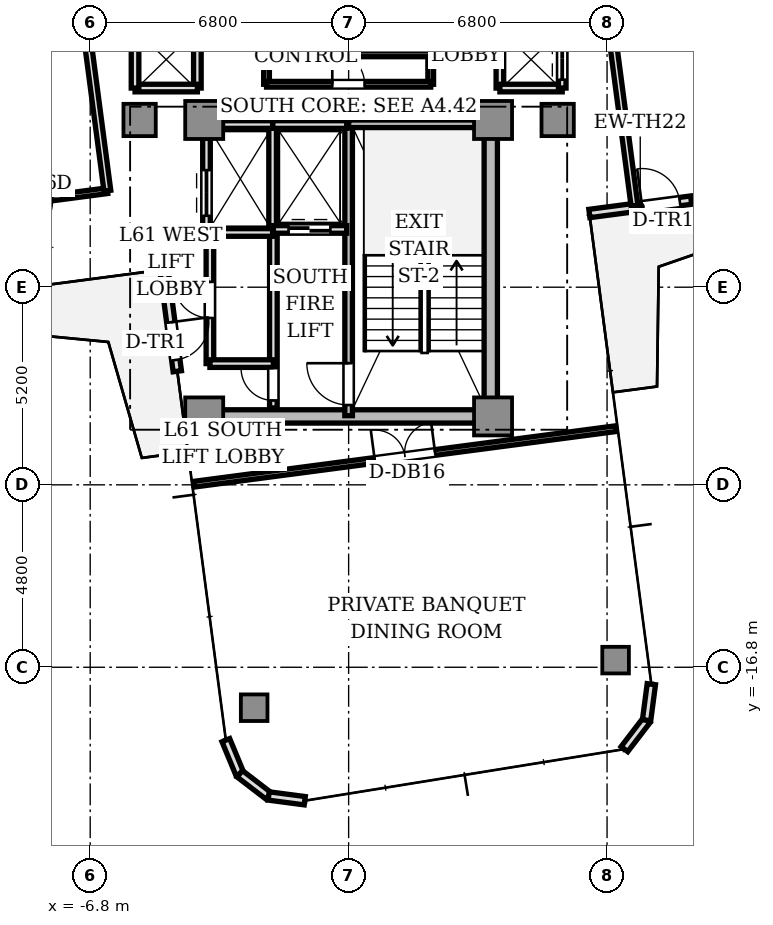
"""IFC4 building model, lengths in metres.
Left out: names, types, materials, properties, quantities, classifications, styles, units other than length and angle.
Written with IfcOpenShell. Run it as: python <this file> out.ifc"""

import sys

from ifc_helpers import new_model, si_unit, direction, frame, frame_2d, origin, origin_2d, place, context, subcontext, project, spatial, rectangle, extrude, source, transform, mapped, element, fill, save


model = new_model("IFC4")
c1 = context("Model", 3, precision=1e-05, world=origin(), true_north=direction((0.0, 1.0)))
c2 = subcontext(c1, "Body", "Model", "MODEL_VIEW")
j1 = project(units=[si_unit("LENGTHUNIT", "METRE"), si_unit("PLANEANGLEUNIT", "RADIAN")], contexts=[c1])
p1 = place(None, origin())
s1 = spatial("IfcSite", under=j1, at=p1, CompositionType="ELEMENT")
p2 = place(p1, origin())
s2 = spatial("IfcBuilding", under=s1, at=p2, CompositionType="ELEMENT")
p3 = place(p2, frame((0.0, 0.0, 219.9)))
s3 = spatial("IfcBuildingStorey", under=s2, at=p3, CompositionType="ELEMENT", Elevation=219.9)
p4 = place(p3, frame((-3.55, -10.2, 0.0), z_axis=(0.0, 0.0, 1.0), x_axis=(1.0, 0.0, 0.0)))
e1 = element("IfcWall", 1, at=p4, inside=s3, PredefinedType="SHEAR", context=c2, shape_type="SweptSolid", body=[
    extrude(rectangle(XDim=7.1, YDim=0.35, at=frame_2d((3.55, 0.0))), origin(), (0.0, 0.0, 1.0), 3.11),
])
p5 = place(p3, frame((3.74, -9.75, 0.0), z_axis=(0.0, 0.0, 1.0), x_axis=(0.0, 1.0, 0.0)))
e2 = element("IfcWall", 2, at=p5, inside=s3, PredefinedType="SHEAR", context=c2, shape_type="SweptSolid", body=[
    extrude(rectangle(XDim=6.9, YDim=0.35, at=frame_2d((3.45, 0.0))), origin(), (0.0, 0.0, 1.0), 3.11),
])
m1 = source(origin(), c2, "Body", "SweptSolid", [
    extrude(rectangle(XDim=1.0, YDim=1.0, at=origin_2d()), origin(), (0.0, 0.0, 1.0), 3.11),
])
for number, where, z_axis, x_axis in (
    (3, (-3.8, -2.4, 0.0), (0.0, 0.0, 1.0), (1.0, 0.0, 0.0)),
    (4, (3.8, -2.4, 0.0), (0.0, 0.0, 1.0), (1.0, 0.0, 0.0)),
    (5, (-3.8, -10.2, 0.0), (0.0, 0.0, 1.0), (1.0, 0.0, 0.0)),
    (6, (3.8, -10.2, 0.0), (0.0, 0.0, 1.0), (1.0, 0.0, 0.0)),
):
    element("IfcColumn", number, at=place(p3, frame(where, z_axis=z_axis, x_axis=x_axis)), inside=s3, PredefinedType="COLUMN", context=c2, shape_type="MappedRepresentation", body=[
        mapped(m1, transform((0.0, 0.0, 0.0), scale=1.0)),
    ])
m2 = source(origin(), c2, "Body", "SweptSolid", [
    extrude(rectangle(XDim=0.85, YDim=0.85, at=origin_2d()), origin(), (0.0, 0.0, 1.0), 3.11),
])
for number, where, z_axis, x_axis in (
    (7, (5.5, -2.4, 0.0), (0.0, 0.0, 1.0), (1.0, 0.0, 0.0)),
    (8, (-5.5, -2.4, 0.0), (0.0, 0.0, 1.0), (1.0, 0.0, 0.0)),
):
    element("IfcColumn", number, at=place(p3, frame(where, z_axis=z_axis, x_axis=x_axis)), inside=s3, PredefinedType="COLUMN", context=c2, shape_type="MappedRepresentation", body=[
        mapped(m2, transform((0.0, 0.0, 0.0), scale=1.0)),
    ])
m3 = source(origin(), c2, "Body", "SweptSolid", [
    extrude(rectangle(XDim=0.7, YDim=0.7, at=origin_2d()), origin(), (0.0, 0.0, 1.0), 3.11),
])
for number, where, z_axis, x_axis in (
    (9, (-2.486, -17.864, 0.0), (0.0, 0.0, 1.0), (1.0, 0.0, 0.0)),
    (10, (7.024, -16.612, 0.0), (0.0, 0.0, 1.0), (1.0, 0.0, 0.0)),
):
    element("IfcColumn", number, at=place(p3, frame(where, z_axis=z_axis, x_axis=x_axis)), inside=s3, PredefinedType="COLUMN", context=c2, shape_type="MappedRepresentation", body=[
        mapped(m3, transform((0.0, 0.0, 0.0), scale=1.0)),
    ])
p6 = place(p3, frame((6.335, -4.861, 0.0), z_axis=(0.0, 0.0, 1.0), x_axis=(0.991449985986, 0.130487261016, 0.0)))
e11 = element("IfcWall", 11, at=p6, inside=s3, PredefinedType="STANDARD", context=c2, shape_type="SweptSolid", body=[
    extrude(rectangle(XDim=2.7, YDim=0.22, at=frame_2d((1.35, 0.0))), origin(), (0.0, 0.0, 1.0), 3.11),
])
p7 = place(p6, frame((1.4, 0.0, 0.0)))
e12 = element("IfcOpeningElement", 12, at=p7, cuts=e11, PredefinedType="OPENING", context=c2, shape_type="SweptSolid", body=[
    extrude(rectangle(XDim=1.0, YDim=2.2, at=frame_2d((0.5, 1.1))), frame((0.0, 0.12, 0.0), z_axis=(0.0, -1.0, 0.0), x_axis=(1.0, 0.0, 0.0)), (0.0, 0.0, 1.0), 0.24),
])
p8 = place(p3, frame((-4.861, -6.335, 0.0), z_axis=(0.0, 0.0, 1.0), x_axis=(0.130487261016, -0.991449985986, 0.0)))
e13 = element("IfcWall", 13, at=p8, inside=s3, PredefinedType="STANDARD", context=c2, shape_type="SweptSolid", body=[
    extrude(rectangle(XDim=2.7, YDim=0.22, at=frame_2d((1.35, 0.0))), origin(), (0.0, 0.0, 1.0), 3.11),
])
p9 = place(p8, frame((1.4, 0.0, 0.0)))
e14 = element("IfcOpeningElement", 14, at=p9, cuts=e13, PredefinedType="OPENING", context=c2, shape_type="SweptSolid", body=[
    extrude(rectangle(XDim=1.0, YDim=2.2, at=frame_2d((0.5, 1.1))), frame((0.0, 0.12, 0.0), z_axis=(0.0, -1.0, 0.0), x_axis=(1.0, 0.0, 0.0)), (0.0, 0.0, 1.0), 0.24),
])
p10 = place(p3, frame((-3.23, -18.719, 0.0), z_axis=(0.0, 0.0, 1.0), x_axis=(0.382441868588, -0.923979554509, 0.0)))
e15 = element("IfcWall", 15, at=p10, inside=s3, PredefinedType="STANDARD", context=c2, shape_type="SweptSolid", body=[
    extrude(rectangle(XDim=0.958, YDim=0.22, at=frame_2d((0.479, 0.0))), origin(), (0.0, 0.0, 1.0), 3.11),
])
p11 = place(p3, frame((-2.864, -19.604, 0.0), z_axis=(0.0, 0.0, 1.0), x_axis=(0.79343813584, -0.60865090536, 0.0)))
e16 = element("IfcWall", 16, at=p11, inside=s3, PredefinedType="STANDARD", context=c2, shape_type="SweptSolid", body=[
    extrude(rectangle(XDim=0.958, YDim=0.22, at=frame_2d((0.479, 0.0))), origin(), (0.0, 0.0, 1.0), 3.11),
])
p12 = place(p3, frame((-2.104, -20.187, 0.0), z_axis=(0.0, 0.0, 1.0), x_axis=(0.991440402921, -0.13056005306, 0.0)))
e17 = element("IfcWall", 17, at=p12, inside=s3, PredefinedType="STANDARD", context=c2, shape_type="SweptSolid", body=[
    extrude(rectangle(XDim=0.958, YDim=0.22, at=frame_2d((0.479, 0.0))), origin(), (0.0, 0.0, 1.0), 3.11),
])
for number, where, z_axis, x_axis in (
    (18, (7.257, -18.954, 0.0), (0.0, 0.0, 1.0), (0.609, 0.793, 0.0)),
    (19, (7.84, -18.194, 0.0), (0.0, 0.0, 1.0), (0.131, 0.991, 0.0)),
):
    element("IfcWall", number, at=place(p3, frame(where, z_axis=z_axis, x_axis=x_axis)), inside=s3, PredefinedType="STANDARD", context=c2, shape_type="SweptSolid", body=[
        extrude(rectangle(XDim=0.958, YDim=0.22, at=frame_2d((0.479, 0.0))), origin(), (0.0, 0.0, 1.0), 3.11),
    ])
p13 = place(p3, frame((0.0, -10.18, 0.0), z_axis=(0.0, 0.0, 1.0), x_axis=(0.0, 1.0, 0.0)))
e20 = element("IfcWall", 20, at=p13, inside=s3, PredefinedType="SOLIDWALL", context=c2, shape_type="SweptSolid", body=[
    extrude(rectangle(XDim=7.68, YDim=0.2, at=frame_2d((3.84, 0.0))), origin(), (0.0, 0.0, 1.0), 3.11),
])
p14 = place(p13, frame((0.28, 0.0, 0.0)))
e21 = element("IfcOpeningElement", 21, at=p14, cuts=e20, PredefinedType="OPENING", context=c2, shape_type="SweptSolid", body=[
    extrude(rectangle(XDim=1.1, YDim=2.15, at=frame_2d((0.55, 1.075))), frame((0.0, 0.11, 0.0), z_axis=(0.0, -1.0, 0.0), x_axis=(1.0, 0.0, 0.0)), (0.0, 0.0, 1.0), 0.22),
])
p15 = place(p3, frame((0.0, -2.5, 0.0), z_axis=(0.0, 0.0, 1.0), x_axis=(1.0, 0.0, 0.0)))
e22 = element("IfcWall", 22, at=p15, inside=s3, PredefinedType="SOLIDWALL", context=c2, shape_type="SweptSolid", body=[
    extrude(rectangle(XDim=3.72, YDim=0.2, at=frame_2d((1.86, 0.0))), origin(), (0.0, 0.0, 1.0), 3.11),
])
p16 = place(p3, frame((-1.98, -9.98, 0.0), z_axis=(0.0, 0.0, 1.0), x_axis=(0.0, 1.0, 0.0)))
e23 = element("IfcWall", 23, at=p16, inside=s3, PredefinedType="SOLIDWALL", context=c2, shape_type="SweptSolid", body=[
    extrude(rectangle(XDim=4.66, YDim=0.2, at=frame_2d((2.33, 0.0))), origin(), (0.0, 0.0, 1.0), 2.66),
])
p17 = place(p16, frame((0.2, 0.0, 0.0)))
e24 = element("IfcOpeningElement", 24, at=p17, cuts=e23, PredefinedType="OPENING", context=c2, shape_type="SweptSolid", body=[
    extrude(rectangle(XDim=0.85, YDim=2.1, at=frame_2d((0.425, 1.05))), frame((0.0, 0.11, 0.0), z_axis=(0.0, -1.0, 0.0), x_axis=(1.0, 0.0, 0.0)), (0.0, 0.0, 1.0), 0.22),
])
p18 = place(p3, frame((-2.0, -5.28, 0.0), z_axis=(0.0, 0.0, 1.0), x_axis=(0.0, 1.0, 0.0)))
e25 = element("IfcWall", 25, at=p18, inside=s3, PredefinedType="SOLIDWALL", context=c2, shape_type="SweptSolid", body=[
    extrude(rectangle(XDim=2.78, YDim=0.2, at=frame_2d((1.39, 0.0))), origin(), (0.0, 0.0, 1.0), 2.66),
])
p19 = place(p3, frame((-2.0, -2.52, 0.0), z_axis=(0.0, 0.0, 1.0), x_axis=(1.0, 0.0, 0.0)))
e26 = element("IfcWall", 26, at=p19, inside=s3, PredefinedType="SOLIDWALL", context=c2, shape_type="SweptSolid", body=[
    extrude(rectangle(XDim=1.95, YDim=0.2, at=frame_2d((0.975, 0.0))), origin(), (0.0, 0.0, 1.0), 2.66),
])
p20 = place(p3, frame((-1.98, -5.28, 0.0), z_axis=(0.0, 0.0, 1.0), x_axis=(1.0, 0.0, 0.0)))
e27 = element("IfcWall", 27, at=p20, inside=s3, PredefinedType="SOLIDWALL", context=c2, shape_type="SweptSolid", body=[
    extrude(rectangle(XDim=1.93, YDim=0.2, at=frame_2d((0.965, 0.0))), origin(), (0.0, 0.0, 1.0), 2.66),
])
p21 = place(p20, frame((0.4, 0.0, 0.0)))
e28 = element("IfcOpeningElement", 28, at=p21, cuts=e27, PredefinedType="OPENING", context=c2, shape_type="SweptSolid", body=[
    extrude(rectangle(XDim=1.1, YDim=2.2, at=frame_2d((0.55, 1.1))), frame((0.0, 0.11, 0.0), z_axis=(0.0, -1.0, 0.0), x_axis=(1.0, 0.0, 0.0)), (0.0, 0.0, 1.0), 0.22),
])
p22 = place(p3, frame((-3.32, -2.52, 0.0), z_axis=(0.0, 0.0, 1.0), x_axis=(1.0, 0.0, 0.0)))
e29 = element("IfcWall", 29, at=p22, inside=s3, PredefinedType="SOLIDWALL", context=c2, shape_type="SweptSolid", body=[
    extrude(rectangle(XDim=1.32, YDim=0.2, at=frame_2d((0.66, 0.0))), origin(), (0.0, 0.0, 1.0), 2.66),
])
p23 = place(p3, frame((-3.74, -5.36, 0.0), z_axis=(0.0, 0.0, 1.0), x_axis=(1.0, 0.0, 0.0)))
e30 = element("IfcWall", 30, at=p23, inside=s3, PredefinedType="SOLIDWALL", context=c2, shape_type="SweptSolid", body=[
    extrude(rectangle(XDim=1.74, YDim=0.2, at=frame_2d((0.87, 0.0))), origin(), (0.0, 0.0, 1.0), 2.66),
])
p24 = place(p3, frame((-3.74, -5.36, 0.0), z_axis=(0.0, 0.0, 1.0), x_axis=(0.0, 1.0, 0.0)))
e31 = element("IfcWall", 31, at=p24, inside=s3, PredefinedType="SOLIDWALL", context=c2, shape_type="SweptSolid", body=[
    extrude(rectangle(XDim=2.48, YDim=0.2, at=frame_2d((1.24, 0.0))), origin(), (0.0, 0.0, 1.0), 2.66),
])
p25 = place(p24, frame((0.44, 0.0, 0.0)))
e32 = element("IfcOpeningElement", 32, at=p25, cuts=e31, PredefinedType="OPENING", context=c2, shape_type="SweptSolid", body=[
    extrude(rectangle(XDim=1.2, YDim=2.2, at=frame_2d((0.6, 1.1))), frame((0.0, 0.11, 0.0), z_axis=(0.0, -1.0, 0.0), x_axis=(1.0, 0.0, 0.0)), (0.0, 0.0, 1.0), 0.22),
])
p26 = place(p3, frame((3.98, -1.56, 0.0), z_axis=(0.0, 0.0, 1.0), x_axis=(0.0, 1.0, 0.0)))
e33 = element("IfcWall", 33, at=p26, inside=s3, PredefinedType="SOLIDWALL", context=c2, shape_type="SweptSolid", body=[
    extrude(rectangle(XDim=3.12, YDim=0.2, at=frame_2d((1.56, 0.0))), origin(), (0.0, 0.0, 1.0), 2.33),
])
p27 = place(p3, frame((3.98, -1.56, 0.0), z_axis=(0.0, 0.0, 1.0), x_axis=(1.0, 0.0, 0.0)))
e34 = element("IfcWall", 34, at=p27, inside=s3, PredefinedType="SOLIDWALL", context=c2, shape_type="SweptSolid", body=[
    extrude(rectangle(XDim=1.64, YDim=0.2, at=frame_2d((0.82, 0.0))), origin(), (0.0, 0.0, 1.0), 2.66),
])
p28 = place(p3, frame((5.62, -1.56, 0.0), z_axis=(0.0, 0.0, 1.0), x_axis=(0.0, 1.0, 0.0)))
e35 = element("IfcWall", 35, at=p28, inside=s3, PredefinedType="SOLIDWALL", context=c2, shape_type="SweptSolid", body=[
    extrude(rectangle(XDim=1.56, YDim=0.2, at=frame_2d((0.78, 0.0))), origin(), (0.0, 0.0, 1.0), 2.66),
])
p29 = place(p28, frame((0.22, 0.0, 0.0)))
e36 = element("IfcOpeningElement", 36, at=p29, cuts=e35, PredefinedType="OPENING", context=c2, shape_type="SweptSolid", body=[
    extrude(rectangle(XDim=1.1, YDim=2.2, at=frame_2d((0.55, 1.1))), frame((0.0, 0.11, 0.0), z_axis=(0.0, -1.0, 0.0), x_axis=(1.0, 0.0, 0.0)), (0.0, 0.0, 1.0), 0.22),
])
p30 = place(p3, frame((-3.98, -1.56, 0.0), z_axis=(0.0, 0.0, 1.0), x_axis=(0.0, 1.0, 0.0)))
e37 = element("IfcWall", 37, at=p30, inside=s3, PredefinedType="SOLIDWALL", context=c2, shape_type="SweptSolid", body=[
    extrude(rectangle(XDim=3.12, YDim=0.2, at=frame_2d((1.56, 0.0))), origin(), (0.0, 0.0, 1.0), 2.33),
])
p31 = place(p3, frame((-5.62, -1.56, 0.0), z_axis=(0.0, 0.0, 1.0), x_axis=(1.0, 0.0, 0.0)))
e38 = element("IfcWall", 38, at=p31, inside=s3, PredefinedType="SOLIDWALL", context=c2, shape_type="SweptSolid", body=[
    extrude(rectangle(XDim=1.64, YDim=0.2, at=frame_2d((0.82, 0.0))), origin(), (0.0, 0.0, 1.0), 2.66),
])
p32 = place(p3, frame((-5.62, -1.56, 0.0), z_axis=(0.0, 0.0, 1.0), x_axis=(0.0, 1.0, 0.0)))
e39 = element("IfcWall", 39, at=p32, inside=s3, PredefinedType="SOLIDWALL", context=c2, shape_type="SweptSolid", body=[
    extrude(rectangle(XDim=1.56, YDim=0.2, at=frame_2d((0.78, 0.0))), origin(), (0.0, 0.0, 1.0), 2.66),
])
p33 = place(p3, frame((-3.65, -8.81, 0.0), z_axis=(0.0, 0.0, 1.0), x_axis=(0.0, 1.0, 0.0)))
e40 = element("IfcWall", 40, at=p33, inside=s3, PredefinedType="SOLIDWALL", context=c2, shape_type="SweptSolid", body=[
    extrude(rectangle(XDim=3.43, YDim=0.2, at=frame_2d((1.715, 0.0))), origin(), (0.0, 0.0, 1.0), 2.66),
])
p34 = place(p33, frame((1.2, 0.0, 0.0)))
e41 = element("IfcOpeningElement", 41, at=p34, cuts=e40, PredefinedType="OPENING", context=c2, shape_type="SweptSolid", body=[
    extrude(rectangle(XDim=0.95, YDim=2.15, at=frame_2d((0.475, 1.075))), frame((0.0, 0.11, 0.0), z_axis=(0.0, -1.0, 0.0), x_axis=(1.0, 0.0, 0.0)), (0.0, 0.0, 1.0), 0.22),
])
p35 = place(p3, frame((-3.65, -8.81, 0.0), z_axis=(0.0, 0.0, 1.0), x_axis=(1.0, 0.0, 0.0)))
e42 = element("IfcWall", 42, at=p35, inside=s3, PredefinedType="SOLIDWALL", context=c2, shape_type="SweptSolid", body=[
    extrude(rectangle(XDim=1.67, YDim=0.2, at=frame_2d((0.835, 0.0))), origin(), (0.0, 0.0, 1.0), 2.66),
])
p36 = place(p3, frame((2.16, -1.46, 0.0), z_axis=(0.0, 0.0, 1.0), x_axis=(0.0, 1.0, 0.0)))
e43 = element("IfcWall", 43, at=p36, inside=s3, PredefinedType="PARTITIONING", context=c2, shape_type="SweptSolid", body=[
    extrude(rectangle(XDim=2.92, YDim=0.15, at=frame_2d((1.46, 0.0))), origin(), (0.0, 0.0, 1.0), 2.66),
])
p37 = place(p36, frame((1.035, 0.0, 0.0)))
e44 = element("IfcOpeningElement", 44, at=p37, cuts=e43, PredefinedType="OPENING", context=c2, shape_type="SweptSolid", body=[
    extrude(rectangle(XDim=0.85, YDim=2.1, at=frame_2d((0.425, 1.05))), frame((0.0, 0.085, 0.0), z_axis=(0.0, -1.0, 0.0), x_axis=(1.0, 0.0, 0.0)), (0.0, 0.0, 1.0), 0.17),
])
p38 = place(p3, frame((-2.16, -1.46, 0.0), z_axis=(0.0, 0.0, 1.0), x_axis=(0.0, 1.0, 0.0)))
e45 = element("IfcWall", 45, at=p38, inside=s3, PredefinedType="PARTITIONING", context=c2, shape_type="SweptSolid", body=[
    extrude(rectangle(XDim=2.92, YDim=0.15, at=frame_2d((1.46, 0.0))), origin(), (0.0, 0.0, 1.0), 2.66),
])
p39 = place(p3, frame((-2.16, -1.46, 0.0), z_axis=(0.0, 0.0, 1.0), x_axis=(1.0, 0.0, 0.0)))
e46 = element("IfcWall", 46, at=p39, inside=s3, PredefinedType="PARTITIONING", context=c2, shape_type="SweptSolid", body=[
    extrude(rectangle(XDim=4.32, YDim=0.15, at=frame_2d((2.16, 0.0))), origin(), (0.0, 0.0, 1.0), 2.66),
])
p40 = place(p39, frame((1.73, 0.0, 0.0)))
e47 = element("IfcOpeningElement", 47, at=p40, cuts=e46, PredefinedType="OPENING", context=c2, shape_type="SweptSolid", body=[
    extrude(rectangle(XDim=0.85, YDim=2.1, at=frame_2d((0.425, 1.05))), frame((0.0, 0.085, 0.0), z_axis=(0.0, -1.0, 0.0), x_axis=(1.0, 0.0, 0.0)), (0.0, 0.0, 1.0), 0.17),
])
p41 = place(p3, frame((-2.16, -0.66, 0.0), z_axis=(0.0, 0.0, 1.0), x_axis=(1.0, 0.0, 0.0)))
e48 = element("IfcWall", 48, at=p41, inside=s3, PredefinedType="PARTITIONING", context=c2, shape_type="SweptSolid", body=[
    extrude(rectangle(XDim=4.32, YDim=0.15, at=frame_2d((2.16, 0.0))), origin(), (0.0, 0.0, 1.0), 2.66),
])
p42 = place(p3, frame((7.522, -4.654, 0.0), z_axis=(0.0, 0.0, 1.0), x_axis=(-0.13053199439, 0.991444097486, 0.0)))
e49 = element("IfcWall", 49, at=p42, inside=s3, PredefinedType="PARTITIONING", context=c2, shape_type="SweptSolid", body=[
    extrude(rectangle(XDim=4.646, YDim=0.18, at=frame_2d((2.323, 0.0))), origin(), (0.0, 0.0, 1.0), 2.66),
])
p43 = place(p3, frame((-6.348, -4.261, 0.0), z_axis=(0.0, 0.0, 1.0), x_axis=(-0.991443655047, -0.130535354851, 0.0)))
e50 = element("IfcWall", 50, at=p43, inside=s3, PredefinedType="PARTITIONING", context=c2, shape_type="SweptSolid", body=[
    extrude(rectangle(XDim=8.437, YDim=0.15, at=frame_2d((4.219, 0.0))), origin(), (0.0, 0.0, 1.0), 2.66),
])
p44 = place(p43, frame((1.466, 0.0, 0.0)))
e51 = element("IfcOpeningElement", 51, at=p44, cuts=e50, PredefinedType="OPENING", context=c2, shape_type="SweptSolid", body=[
    extrude(rectangle(XDim=0.85, YDim=2.1, at=frame_2d((0.425, 1.05))), frame((0.0, 0.085, 0.0), z_axis=(0.0, -1.0, 0.0), x_axis=(1.0, 0.0, 0.0)), (0.0, 0.0, 1.0), 0.17),
])
p45 = place(p43, frame((4.709, 0.0, 0.0)))
e52 = element("IfcOpeningElement", 52, at=p45, cuts=e50, PredefinedType="OPENING", context=c2, shape_type="SweptSolid", body=[
    extrude(rectangle(XDim=0.85, YDim=2.1, at=frame_2d((0.425, 1.05))), frame((0.0, 0.085, 0.0), z_axis=(0.0, -1.0, 0.0), x_axis=(1.0, 0.0, 0.0)), (0.0, 0.0, 1.0), 0.17),
])
p46 = place(p3, frame((-7.522, 4.654, 0.0), z_axis=(0.0, 0.0, 1.0), x_axis=(0.130514913627, -0.991446346163, 0.0)))
e53 = element("IfcWall", 53, at=p46, inside=s3, PredefinedType="PARTITIONING", context=c2, shape_type="SweptSolid", body=[
    extrude(rectangle(XDim=8.992, YDim=0.18, at=frame_2d((4.496, 0.0))), origin(), (0.0, 0.0, 1.0), 2.66),
])
p47 = place(p3, frame((-4.067, -11.983, 0.0), z_axis=(0.0, 0.0, 1.0), x_axis=(0.991443749146, 0.130534640152, 0.0)))
e54 = element("IfcWall", 54, at=p47, inside=s3, PredefinedType="PARTITIONING", context=c2, shape_type="SweptSolid", body=[
    extrude(rectangle(XDim=11.192, YDim=0.15, at=frame_2d((5.596, 0.0))), origin(), (0.0, 0.0, 1.0), 2.66),
])
p48 = place(p47, frame((4.796, 0.0, 0.0)))
e55 = element("IfcOpeningElement", 55, at=p48, cuts=e54, PredefinedType="OPENING", context=c2, shape_type="SweptSolid", body=[
    extrude(rectangle(XDim=1.6, YDim=2.25, at=frame_2d((0.8, 1.125))), frame((0.0, 0.085, 0.0), z_axis=(0.0, -1.0, 0.0), x_axis=(1.0, 0.0, 0.0)), (0.0, 0.0, 1.0), 0.17),
])
m4 = source(origin(), c2, "Body", "SweptSolid", [
    extrude(rectangle(XDim=1.0, YDim=0.05, at=origin_2d()), origin(), (0.0, 0.0, 1.0), 2.2),
])
p49 = place(p7, frame((0.5, 0.0, 0.0)))
e56 = element("IfcDoor", 56, at=p49, inside=s3, OperationType="SINGLE_SWING_LEFT", PredefinedType="DOOR", context=c2, shape_type="MappedRepresentation", body=[
    mapped(m4, transform((0.0, 0.0, 0.0), scale=1.0)),
])
fill(e12, e56)
p50 = place(p9, frame((0.5, 0.0, 0.0)))
e57 = element("IfcDoor", 57, at=p50, inside=s3, OperationType="SINGLE_SWING_LEFT", PredefinedType="DOOR", context=c2, shape_type="MappedRepresentation", body=[
    mapped(m4, transform((0.0, 0.0, 0.0), scale=1.0)),
])
fill(e14, e57)
m5 = source(origin(), c2, "Body", "SweptSolid", [
    extrude(rectangle(XDim=1.1, YDim=0.05, at=origin_2d()), origin(), (0.0, 0.0, 1.0), 2.15),
])
p51 = place(p14, frame((0.55, 0.0, 0.0)))
e58 = element("IfcDoor", 58, at=p51, inside=s3, OperationType="SINGLE_SWING_RIGHT", PredefinedType="DOOR", context=c2, shape_type="MappedRepresentation", body=[
    mapped(m5, transform((0.0, 0.0, 0.0), scale=1.0)),
])
fill(e21, e58)
m6 = source(origin(), c2, "Body", "SweptSolid", [
    extrude(rectangle(XDim=0.85, YDim=0.05, at=origin_2d()), origin(), (0.0, 0.0, 1.0), 2.1),
])
p52 = place(p17, frame((0.425, 0.0, 0.0)))
e59 = element("IfcDoor", 59, at=p52, inside=s3, OperationType="SINGLE_SWING_RIGHT", PredefinedType="DOOR", context=c2, shape_type="MappedRepresentation", body=[
    mapped(m6, transform((0.0, 0.0, 0.0), scale=1.0)),
])
fill(e24, e59)
m7 = source(origin(), c2, "Body", "SweptSolid", [
    extrude(rectangle(XDim=1.1, YDim=0.05, at=origin_2d()), origin(), (0.0, 0.0, 1.0), 2.2),
])
p53 = place(p21, frame((0.55, 0.0, 0.0)))
e60 = element("IfcDoor", 60, at=p53, inside=s3, OperationType="DOUBLE_DOOR_SLIDING", PredefinedType="DOOR", context=c2, shape_type="MappedRepresentation", body=[
    mapped(m7, transform((0.0, 0.0, 0.0), scale=1.0)),
])
fill(e28, e60)
m8 = source(origin(), c2, "Body", "SweptSolid", [
    extrude(rectangle(XDim=1.2, YDim=0.05, at=origin_2d()), origin(), (0.0, 0.0, 1.0), 2.2),
])
p54 = place(p25, frame((0.6, 0.0, 0.0)))
e61 = element("IfcDoor", 61, at=p54, inside=s3, OperationType="DOUBLE_DOOR_SLIDING", PredefinedType="DOOR", context=c2, shape_type="MappedRepresentation", body=[
    mapped(m8, transform((0.0, 0.0, 0.0), scale=1.0)),
])
fill(e32, e61)
p55 = place(p29, frame((0.55, 0.0, 0.0)))
e62 = element("IfcDoor", 62, at=p55, inside=s3, OperationType="DOUBLE_DOOR_SLIDING", PredefinedType="DOOR", context=c2, shape_type="MappedRepresentation", body=[
    mapped(m7, transform((0.0, 0.0, 0.0), scale=1.0)),
])
fill(e36, e62)
m9 = source(origin(), c2, "Body", "SweptSolid", [
    extrude(rectangle(XDim=0.95, YDim=0.05, at=origin_2d()), origin(), (0.0, 0.0, 1.0), 2.15),
])
p56 = place(p34, frame((0.475, 0.0, 0.0)))
e63 = element("IfcDoor", 63, at=p56, inside=s3, OperationType="SINGLE_SWING_RIGHT", PredefinedType="DOOR", context=c2, shape_type="MappedRepresentation", body=[
    mapped(m9, transform((0.0, 0.0, 0.0), scale=1.0)),
])
fill(e41, e63)
p57 = place(p40, frame((0.425, 0.0, 0.0)))
e64 = element("IfcDoor", 64, at=p57, inside=s3, OperationType="SINGLE_SWING_LEFT", PredefinedType="DOOR", context=c2, shape_type="MappedRepresentation", body=[
    mapped(m6, transform((0.0, 0.0, 0.0), scale=1.0)),
])
fill(e47, e64)
m10 = source(origin(), c2, "Body", "SweptSolid", [
    extrude(rectangle(XDim=1.6, YDim=0.05, at=origin_2d()), origin(), (0.0, 0.0, 1.0), 2.25),
])
p58 = place(p48, frame((0.8, 0.0, 0.0)))
e65 = element("IfcDoor", 65, at=p58, inside=s3, OperationType="DOUBLE_DOOR_SINGLE_SWING", PredefinedType="DOOR", context=c2, shape_type="MappedRepresentation", body=[
    mapped(m10, transform((0.0, 0.0, 0.0), scale=1.0)),
])
fill(e55, e65)
save(model, sys.argv[1])
